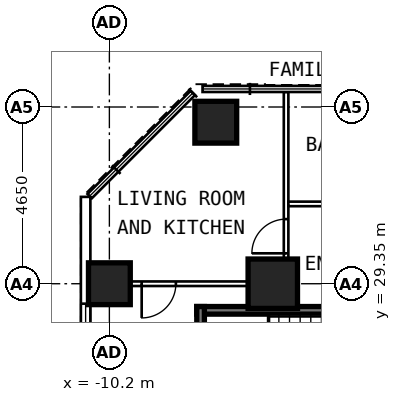
"""IFC4 building model, lengths in metres.
Left out: names, types, materials, properties, quantities, classifications, styles, units other than length and angle.
Written with IfcOpenShell. Run it as: python <this file> out.ifc"""

import sys

from ifc_helpers import new_model, si_unit, direction, frame, frame_2d, origin, origin_2d, place, context, subcontext, project, spatial, rectangle, extrude, element, fill, save


model = new_model("IFC4")
c1 = context("Model", 3, precision=1e-05, world=origin(), true_north=direction((0.0, 1.0)))
c2 = subcontext(c1, "Body", "Model", "MODEL_VIEW")
j1 = project(units=[si_unit("LENGTHUNIT", "METRE"), si_unit("PLANEANGLEUNIT", "RADIAN")], contexts=[c1])
p1 = place(None, origin())
s1 = spatial("IfcSite", under=j1, at=p1, CompositionType="ELEMENT")
p2 = place(p1, origin())
s2 = spatial("IfcBuilding", under=s1, at=p2, CompositionType="ELEMENT")
p3 = place(p2, frame((0.0, 0.0, 43.0)))
s3 = spatial("IfcBuildingStorey", under=s2, at=p3, CompositionType="ELEMENT", Elevation=43.0)
for number, where, z_axis, x_axis in (
    (1, (-10.2, 29.35, 0.0), (0.0, 0.0, 1.0), (0.0, 1.0, 0.0)),
    (2, (-7.4, 33.6, 0.0), (0.0, 0.0, 1.0), (0.0, 1.0, 0.0)),
):
    element("IfcColumn", number, at=place(p3, frame(where, z_axis=z_axis, x_axis=x_axis)), inside=s3, PredefinedType="COLUMN", context=c2, shape_type="SweptSolid", body=[
        extrude(rectangle(XDim=1.1, YDim=1.1, at=origin_2d()), origin(), (0.0, 0.0, 1.0), 3.6),
    ])
p4 = place(p3, frame((-5.9, 29.35, 0.0), z_axis=(0.0, 0.0, 1.0), x_axis=(0.0, 1.0, 0.0)))
e3 = element("IfcColumn", 3, at=p4, inside=s3, PredefinedType="COLUMN", context=c2, shape_type="SweptSolid", body=[
    extrude(rectangle(XDim=1.3, YDim=1.3, at=origin_2d()), origin(), (0.0, 0.0, 1.0), 3.6),
])
p5 = place(p3, frame((-10.825, 6.409, 0.0), z_axis=(0.0, 0.0, 1.0), x_axis=(0.0, 1.0, 0.0)))
e4 = element("IfcWall", 4, at=p5, inside=s3, PredefinedType="SOLIDWALL", context=c2, shape_type="SweptSolid", body=[
    extrude(rectangle(XDim=25.226, YDim=0.25, at=frame_2d((12.613, 0.0))), origin(), (0.0, 0.0, 1.0), 3.35),
])
p6 = place(p5, frame((0.666, 0.0, 0.8)))
e5 = element("IfcOpeningElement", 5, at=p6, cuts=e4, PredefinedType="OPENING", context=c2, shape_type="SweptSolid", body=[
    extrude(rectangle(XDim=1.8, YDim=1.8, at=frame_2d((0.9, 0.9))), frame((0.0, 0.137, 0.0), z_axis=(0.0, -1.0, 0.0), x_axis=(1.0, 0.0, 0.0)), (0.0, 0.0, 1.0), 0.274),
])
p7 = place(p5, frame((3.516, 0.0, 0.8)))
e6 = element("IfcOpeningElement", 6, at=p7, cuts=e4, PredefinedType="OPENING", context=c2, shape_type="SweptSolid", body=[
    extrude(rectangle(XDim=1.8, YDim=1.8, at=frame_2d((0.9, 0.9))), frame((0.0, 0.137, 0.0), z_axis=(0.0, -1.0, 0.0), x_axis=(1.0, 0.0, 0.0)), (0.0, 0.0, 1.0), 0.274),
])
p8 = place(p5, frame((6.366, 0.0, 0.8)))
e7 = element("IfcOpeningElement", 7, at=p8, cuts=e4, PredefinedType="OPENING", context=c2, shape_type="SweptSolid", body=[
    extrude(rectangle(XDim=1.8, YDim=1.8, at=frame_2d((0.9, 0.9))), frame((0.0, 0.137, 0.0), z_axis=(0.0, -1.0, 0.0), x_axis=(1.0, 0.0, 0.0)), (0.0, 0.0, 1.0), 0.274),
])
p9 = place(p5, frame((9.216, 0.0, 0.8)))
e8 = element("IfcOpeningElement", 8, at=p9, cuts=e4, PredefinedType="OPENING", context=c2, shape_type="SweptSolid", body=[
    extrude(rectangle(XDim=1.8, YDim=1.8, at=frame_2d((0.9, 0.9))), frame((0.0, 0.137, 0.0), z_axis=(0.0, -1.0, 0.0), x_axis=(1.0, 0.0, 0.0)), (0.0, 0.0, 1.0), 0.274),
])
p10 = place(p5, frame((12.066, 0.0, 0.8)))
e9 = element("IfcOpeningElement", 9, at=p10, cuts=e4, PredefinedType="OPENING", context=c2, shape_type="SweptSolid", body=[
    extrude(rectangle(XDim=1.8, YDim=1.8, at=frame_2d((0.9, 0.9))), frame((0.0, 0.137, 0.0), z_axis=(0.0, -1.0, 0.0), x_axis=(1.0, 0.0, 0.0)), (0.0, 0.0, 1.0), 0.274),
])
p11 = place(p5, frame((14.916, 0.0, 0.8)))
e10 = element("IfcOpeningElement", 10, at=p11, cuts=e4, PredefinedType="OPENING", context=c2, shape_type="SweptSolid", body=[
    extrude(rectangle(XDim=1.8, YDim=1.8, at=frame_2d((0.9, 0.9))), frame((0.0, 0.137, 0.0), z_axis=(0.0, -1.0, 0.0), x_axis=(1.0, 0.0, 0.0)), (0.0, 0.0, 1.0), 0.274),
])
p12 = place(p5, frame((17.766, 0.0, 0.8)))
e11 = element("IfcOpeningElement", 11, at=p12, cuts=e4, PredefinedType="OPENING", context=c2, shape_type="SweptSolid", body=[
    extrude(rectangle(XDim=1.8, YDim=1.8, at=frame_2d((0.9, 0.9))), frame((0.0, 0.137, 0.0), z_axis=(0.0, -1.0, 0.0), x_axis=(1.0, 0.0, 0.0)), (0.0, 0.0, 1.0), 0.274),
])
p13 = place(p5, frame((20.616, 0.0, 0.8)))
e12 = element("IfcOpeningElement", 12, at=p13, cuts=e4, PredefinedType="OPENING", context=c2, shape_type="SweptSolid", body=[
    extrude(rectangle(XDim=1.8, YDim=1.8, at=frame_2d((0.9, 0.9))), frame((0.0, 0.137, 0.0), z_axis=(0.0, -1.0, 0.0), x_axis=(1.0, 0.0, 0.0)), (0.0, 0.0, 1.0), 0.274),
])
p14 = place(p3, frame((-5.61, 29.35, 0.0), z_axis=(0.0, 0.0, 1.0), x_axis=(-1.0, 0.0, 0.0)))
e13 = element("IfcWall", 13, at=p14, inside=s3, PredefinedType="PARTITIONING", context=c2, shape_type="SweptSolid", body=[
    extrude(rectangle(XDim=5.09, YDim=0.12, at=frame_2d((2.545, 0.0))), origin(), (0.0, 0.0, 1.0), 2.45),
])
p15 = place(p14, frame((2.84, 0.0, 0.0)))
e14 = element("IfcOpeningElement", 14, at=p15, cuts=e13, PredefinedType="OPENING", context=c2, shape_type="SweptSolid", body=[
    extrude(rectangle(XDim=0.9, YDim=2.1, at=frame_2d((0.45, 1.05))), frame((0.0, 0.072, 0.0), z_axis=(0.0, -1.0, 0.0), x_axis=(1.0, 0.0, 0.0)), (0.0, 0.0, 1.0), 0.144),
])
p16 = place(p3, frame((-5.55, 28.95, 0.0), z_axis=(0.0, 0.0, 1.0), x_axis=(0.0, 1.0, 0.0)))
e15 = element("IfcWall", 15, at=p16, inside=s3, PredefinedType="PARTITIONING", context=c2, shape_type="SweptSolid", body=[
    extrude(rectangle(XDim=5.445, YDim=0.12, at=frame_2d((2.723, 0.0))), origin(), (0.0, 0.0, 1.0), 3.35),
])
p17 = place(p16, frame((1.2, 0.0, 0.0)))
e16 = element("IfcOpeningElement", 16, at=p17, cuts=e15, PredefinedType="OPENING", context=c2, shape_type="SweptSolid", body=[
    extrude(rectangle(XDim=0.9, YDim=2.1, at=frame_2d((0.45, 1.05))), frame((0.0, 0.072, 0.0), z_axis=(0.0, -1.0, 0.0), x_axis=(1.0, 0.0, 0.0)), (0.0, 0.0, 1.0), 0.144),
])
p18 = place(p3, frame((-2.1, 31.45, 0.0), z_axis=(0.0, 0.0, 1.0), x_axis=(-1.0, 0.0, 0.0)))
e17 = element("IfcWall", 17, at=p18, inside=s3, PredefinedType="PARTITIONING", context=c2, shape_type="SweptSolid", body=[
    extrude(rectangle(XDim=3.39, YDim=0.12, at=frame_2d((1.695, 0.0))), origin(), (0.0, 0.0, 1.0), 3.35),
])
p19 = place(p18, frame((1.295, 0.0, 0.0)))
e18 = element("IfcOpeningElement", 18, at=p19, cuts=e17, PredefinedType="OPENING", context=c2, shape_type="SweptSolid", body=[
    extrude(rectangle(XDim=0.8, YDim=2.1, at=frame_2d((0.4, 1.05))), frame((0.0, 0.072, 0.0), z_axis=(0.0, -1.0, 0.0), x_axis=(1.0, 0.0, 0.0)), (0.0, 0.0, 1.0), 0.144),
])
p20 = place(p3, frame((-2.1, 28.65, 0.0), z_axis=(0.0, 0.0, 1.0), x_axis=(-1.0, 0.0, 0.0)))
e19 = element("IfcWall", 19, at=p20, inside=s3, PredefinedType="SHEAR", context=c2, shape_type="SweptSolid", body=[
    extrude(rectangle(XDim=5.8, YDim=0.2, at=frame_2d((2.9, 0.0))), origin(), (0.0, 0.0, 1.0), 3.33),
])
p21 = place(p3, frame((-7.8, 24.75, 0.0), z_axis=(0.0, 0.0, 1.0), x_axis=(0.0, 1.0, 0.0)))
e20 = element("IfcWall", 20, at=p21, inside=s3, PredefinedType="SHEAR", context=c2, shape_type="SweptSolid", body=[
    extrude(rectangle(XDim=4.0, YDim=0.2, at=frame_2d((2.0, 0.0))), origin(), (0.0, 0.0, 1.0), 3.33),
])
p22 = place(p13, origin())
e21 = element("IfcWindow", 21, at=p22, inside=s3, PartitioningType="SINGLE_PANEL", PredefinedType="WINDOW", context=c2, shape_type="SweptSolid", body=[
    extrude(rectangle(XDim=1.8, YDim=1.8, at=frame_2d((0.9, 0.9))), frame((0.0, 0.03, 0.0), z_axis=(0.0, -1.0, 0.0), x_axis=(1.0, 0.0, 0.0)), (0.0, 0.0, 1.0), 0.06),
])
fill(e12, e21)
p23 = place(p15, origin())
e22 = element("IfcDoor", 22, at=p23, inside=s3, OperationType="SINGLE_SWING_RIGHT", PredefinedType="DOOR", context=c2, shape_type="SweptSolid", body=[
    extrude(rectangle(XDim=0.9, YDim=2.1, at=frame_2d((0.45, 1.05))), frame((0.0, 0.025, 0.0), z_axis=(0.0, -1.0, 0.0), x_axis=(1.0, 0.0, 0.0)), (0.0, 0.0, 1.0), 0.05),
])
fill(e14, e22)
p24 = place(p17, origin())
e23 = element("IfcDoor", 23, at=p24, inside=s3, OperationType="SINGLE_SWING_LEFT", PredefinedType="DOOR", context=c2, shape_type="SweptSolid", body=[
    extrude(rectangle(XDim=0.9, YDim=2.1, at=frame_2d((0.45, 1.05))), frame((0.0, 0.025, 0.0), z_axis=(0.0, -1.0, 0.0), x_axis=(1.0, 0.0, 0.0)), (0.0, 0.0, 1.0), 0.05),
])
fill(e16, e23)
save(model, sys.argv[1])
